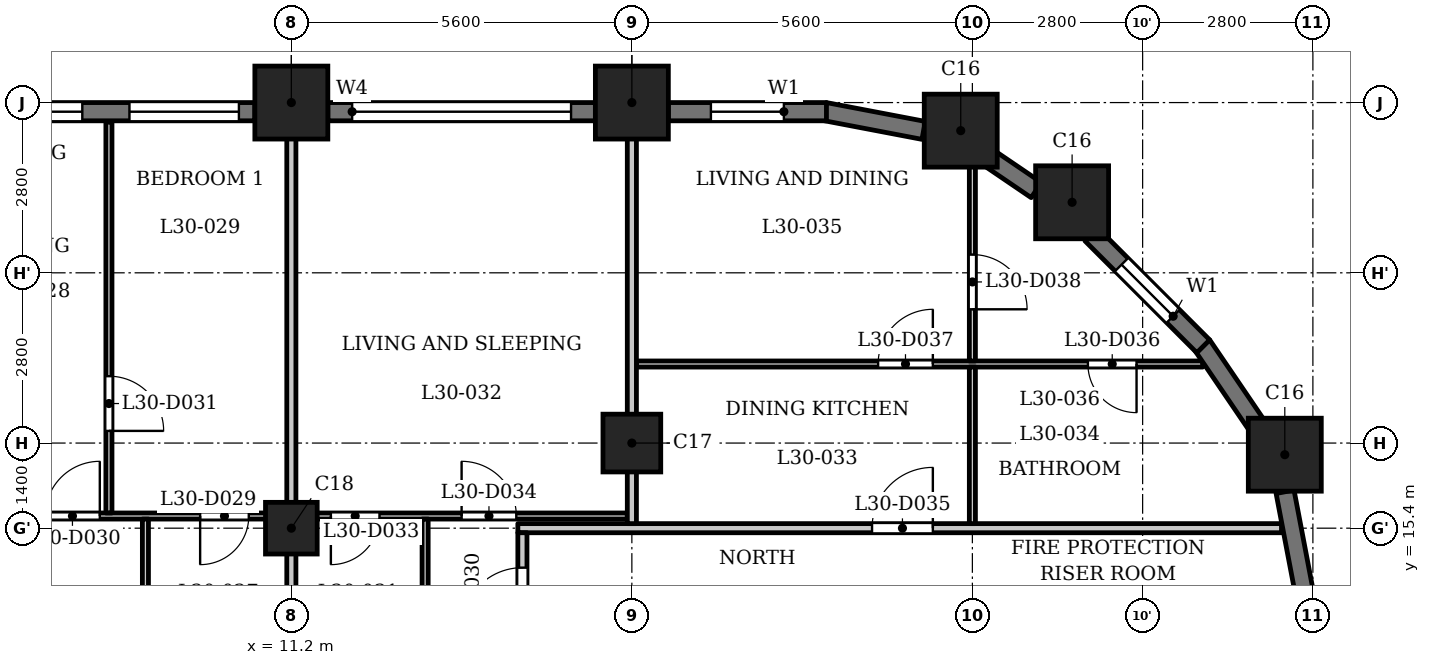
"""IFC4 building model, lengths in metres.
Left out: names, types, materials, properties, quantities, classifications, styles, units other than length and angle.
Written with IfcOpenShell. Run it as: python <this file> out.ifc"""

import sys

from ifc_helpers import new_model, si_unit, direction, frame, frame_2d, origin, origin_2d, place, context, subcontext, project, spatial, rectangle, extrude, element, fill, save


model = new_model("IFC4")
c1 = context("Model", 3, precision=1e-05, world=origin(), true_north=direction((0.0, 1.0)))
c2 = subcontext(c1, "Body", "Model", "MODEL_VIEW")
j1 = project(units=[si_unit("LENGTHUNIT", "METRE"), si_unit("PLANEANGLEUNIT", "RADIAN")], contexts=[c1])
p1 = place(None, origin())
s1 = spatial("IfcSite", under=j1, at=p1, CompositionType="ELEMENT")
p2 = place(p1, origin())
s2 = spatial("IfcBuilding", under=s1, at=p2, CompositionType="ELEMENT")
p3 = place(p2, frame((0.0, 0.0, 118.3)))
s3 = spatial("IfcBuildingStorey", under=s2, at=p3, CompositionType="ELEMENT", Elevation=118.3)
for number, where, z_axis, x_axis in (
    (1, (27.538, 16.609, 0.0), (0.0, 0.0, 1.0), (1.0, 0.0, 0.0)),
    (2, (24.04, 20.76, 0.0), (0.0, 0.0, 1.0), (1.0, 0.0, 0.0)),
    (3, (22.209, 21.938, 0.0), (0.0, 0.0, 1.0), (1.0, 0.0, 0.0)),
    (4, (16.8, 22.4, 0.0), (0.0, 0.0, 1.0), (1.0, 0.0, 0.0)),
    (5, (11.2, 22.4, 0.0), (0.0, 0.0, 1.0), (1.0, 0.0, 0.0)),
):
    element("IfcColumn", number, at=place(p3, frame(where, z_axis=z_axis, x_axis=x_axis)), inside=s3, PredefinedType="COLUMN", context=c2, shape_type="SweptSolid", body=[
        extrude(rectangle(XDim=1.2, YDim=1.2, at=origin_2d()), origin(), (0.0, 0.0, 1.0), 3.5),
    ])
p4 = place(p3, frame((16.8, 16.8, 0.0), z_axis=(0.0, 0.0, 1.0), x_axis=(1.0, 0.0, 0.0)))
e6 = element("IfcColumn", 6, at=p4, inside=s3, PredefinedType="COLUMN", context=c2, shape_type="SweptSolid", body=[
    extrude(rectangle(XDim=0.95, YDim=0.95, at=origin_2d()), origin(), (0.0, 0.0, 1.0), 3.5),
])
p5 = place(p3, frame((11.2, 15.4, 0.0), z_axis=(0.0, 0.0, 1.0), x_axis=(1.0, 0.0, 0.0)))
e7 = element("IfcColumn", 7, at=p5, inside=s3, PredefinedType="COLUMN", context=c2, shape_type="SweptSolid", body=[
    extrude(rectangle(XDim=0.85, YDim=0.85, at=origin_2d()), origin(), (0.0, 0.0, 1.0), 3.5),
])
for number, where, z_axis, x_axis in (
    (8, (27.853, 14.372, 0.0), (0.0, 0.0, 1.0), (-0.187, 0.982, 0.0)),
    (9, (27.11, 17.043, 0.0), (0.0, 0.0, 1.0), (-0.562, 0.827, 0.0)),
):
    element("IfcWall", number, at=place(p3, frame(where, z_axis=z_axis, x_axis=x_axis)), inside=s3, PredefinedType="SOLIDWALL", context=c2, shape_type="SweptSolid", body=[
        extrude(rectangle(XDim=1.656, YDim=0.3, at=frame_2d((0.828, 0.0))), origin(), (0.0, 0.0, 1.0), 2.4),
    ])
p6 = place(p3, frame((26.197, 18.391, 0.0), z_axis=(0.0, 0.0, 1.0), x_axis=(-0.707059830104, 0.707153729152, 0.0)))
e10 = element("IfcWall", 10, at=p6, inside=s3, PredefinedType="SOLIDWALL", context=c2, shape_type="SweptSolid", body=[
    extrude(rectangle(XDim=2.6, YDim=0.3, at=frame_2d((1.3, 0.0))), origin(), (0.0, 0.0, 1.0), 2.4),
])
p7 = place(p6, frame((0.7, 0.0, 0.6)))
e11 = element("IfcOpeningElement", 11, at=p7, cuts=e10, PredefinedType="OPENING", context=c2, shape_type="SweptSolid", body=[
    extrude(rectangle(XDim=1.2, YDim=1.55, at=frame_2d((0.6, 0.775))), frame((0.0, 0.16, 0.0), z_axis=(0.0, -1.0, 0.0), x_axis=(1.0, 0.0, 0.0)), (0.0, 0.0, 1.0), 0.32),
])
p8 = place(p3, frame((23.451, 20.96, 0.0), z_axis=(0.0, 0.0, 1.0), x_axis=(-0.827019434577, 0.562173331661, 0.0)))
e12 = element("IfcWall", 12, at=p8, inside=s3, PredefinedType="SOLIDWALL", context=c2, shape_type="SweptSolid", body=[
    extrude(rectangle(XDim=0.977, YDim=0.3, at=frame_2d((0.489, 0.0))), origin(), (0.0, 0.0, 1.0), 3.2),
])
p9 = place(p3, frame((21.599, 21.942, 0.0), z_axis=(0.0, 0.0, 1.0), x_axis=(-0.98228820662, 0.187376303559, 0.0)))
e13 = element("IfcWall", 13, at=p9, inside=s3, PredefinedType="SOLIDWALL", context=c2, shape_type="SweptSolid", body=[
    extrude(rectangle(XDim=1.656, YDim=0.3, at=frame_2d((0.828, 0.0))), origin(), (0.0, 0.0, 1.0), 2.4),
])
p10 = place(p3, frame((20.0, 22.25, 0.0), z_axis=(0.0, 0.0, 1.0), x_axis=(-1.0, 0.0, 0.0)))
e14 = element("IfcWall", 14, at=p10, inside=s3, PredefinedType="SOLIDWALL", context=c2, shape_type="SweptSolid", body=[
    extrude(rectangle(XDim=2.6, YDim=0.3, at=frame_2d((1.3, 0.0))), origin(), (0.0, 0.0, 1.0), 2.4),
])
p11 = place(p10, frame((0.7, 0.0, 0.6)))
e15 = element("IfcOpeningElement", 15, at=p11, cuts=e14, PredefinedType="OPENING", context=c2, shape_type="SweptSolid", body=[
    extrude(rectangle(XDim=1.2, YDim=1.55, at=frame_2d((0.6, 0.775))), frame((0.0, 0.16, 0.0), z_axis=(0.0, -1.0, 0.0), x_axis=(1.0, 0.0, 0.0)), (0.0, 0.0, 1.0), 0.32),
])
p12 = place(p3, frame((16.2, 22.25, 0.0), z_axis=(0.0, 0.0, 1.0), x_axis=(-1.0, 0.0, 0.0)))
e16 = element("IfcWall", 16, at=p12, inside=s3, PredefinedType="SOLIDWALL", context=c2, shape_type="SweptSolid", body=[
    extrude(rectangle(XDim=4.4, YDim=0.3, at=frame_2d((2.2, 0.0))), origin(), (0.0, 0.0, 1.0), 2.4),
])
p13 = place(p12, frame((0.4, 0.0, 1.2)))
e17 = element("IfcOpeningElement", 17, at=p13, cuts=e16, PredefinedType="OPENING", context=c2, shape_type="SweptSolid", body=[
    extrude(rectangle(XDim=3.6, YDim=0.95, at=frame_2d((1.8, 0.475))), frame((0.0, 0.16, 0.0), z_axis=(0.0, -1.0, 0.0), x_axis=(1.0, 0.0, 0.0)), (0.0, 0.0, 1.0), 0.32),
])
p14 = place(p3, frame((10.6, 22.25, 0.0), z_axis=(0.0, 0.0, 1.0), x_axis=(-1.0, 0.0, 0.0)))
e18 = element("IfcWall", 18, at=p14, inside=s3, PredefinedType="SOLIDWALL", context=c2, shape_type="SweptSolid", body=[
    extrude(rectangle(XDim=4.4, YDim=0.3, at=frame_2d((2.2, 0.0))), origin(), (0.0, 0.0, 1.0), 2.4),
])
p15 = place(p14, frame((0.262, 0.0, 0.9)))
e19 = element("IfcOpeningElement", 19, at=p15, cuts=e18, PredefinedType="OPENING", context=c2, shape_type="SweptSolid", body=[
    extrude(rectangle(XDim=1.8, YDim=1.25, at=frame_2d((0.9, 0.625))), frame((0.0, 0.16, 0.0), z_axis=(0.0, -1.0, 0.0), x_axis=(1.0, 0.0, 0.0)), (0.0, 0.0, 1.0), 0.32),
])
p16 = place(p14, frame((2.837, 0.0, 0.6)))
e20 = element("IfcOpeningElement", 20, at=p16, cuts=e18, PredefinedType="OPENING", context=c2, shape_type="SweptSolid", body=[
    extrude(rectangle(XDim=1.2, YDim=1.55, at=frame_2d((0.6, 0.775))), frame((0.0, 0.16, 0.0), z_axis=(0.0, -1.0, 0.0), x_axis=(1.0, 0.0, 0.0)), (0.0, 0.0, 1.0), 0.32),
])
p17 = place(p3, frame((14.925, 15.4, 0.0), z_axis=(0.0, 0.0, 1.0), x_axis=(1.0, 0.0, 0.0)))
e21 = element("IfcWall", 21, at=p17, inside=s3, PredefinedType="PARTITIONING", context=c2, shape_type="SweptSolid", body=[
    extrude(rectangle(XDim=12.559, YDim=0.15, at=frame_2d((6.279, 0.0))), origin(), (0.0, 0.0, 1.0), 3.2),
])
p18 = place(p17, frame((5.825, 0.0, 0.0)))
e22 = element("IfcOpeningElement", 22, at=p18, cuts=e21, PredefinedType="OPENING", context=c2, shape_type="SweptSolid", body=[
    extrude(rectangle(XDim=1.0, YDim=2.1, at=frame_2d((0.5, 1.05))), frame((0.0, 0.085, 0.0), z_axis=(0.0, -1.0, 0.0), x_axis=(1.0, 0.0, 0.0)), (0.0, 0.0, 1.0), 0.17),
])
p19 = place(p3, frame((-16.725, 15.6, 0.0), z_axis=(0.0, 0.0, 1.0), x_axis=(1.0, 0.0, 0.0)))
e23 = element("IfcWall", 23, at=p19, inside=s3, PredefinedType="PARTITIONING", context=c2, shape_type="SweptSolid", body=[
    extrude(rectangle(XDim=33.45, YDim=0.1, at=frame_2d((16.725, 0.0))), origin(), (0.0, 0.0, 1.0), 3.2),
])
p20 = place(p19, frame((9.425, 0.0, 0.0)))
e24 = element("IfcOpeningElement", 24, at=p20, cuts=e23, PredefinedType="OPENING", context=c2, shape_type="SweptSolid", body=[
    extrude(rectangle(XDim=0.8, YDim=2.1, at=frame_2d((0.4, 1.05))), frame((0.0, 0.06, 0.0), z_axis=(0.0, -1.0, 0.0), x_axis=(1.0, 0.0, 0.0)), (0.0, 0.0, 1.0), 0.12),
])
p21 = place(p19, frame((6.975, 0.0, 0.0)))
e25 = element("IfcOpeningElement", 25, at=p21, cuts=e23, PredefinedType="OPENING", context=c2, shape_type="SweptSolid", body=[
    extrude(rectangle(XDim=0.9, YDim=2.1, at=frame_2d((0.45, 1.05))), frame((0.0, 0.06, 0.0), z_axis=(0.0, -1.0, 0.0), x_axis=(1.0, 0.0, 0.0)), (0.0, 0.0, 1.0), 0.12),
])
p22 = place(p19, frame((1.875, 0.0, 0.0)))
e26 = element("IfcOpeningElement", 26, at=p22, cuts=e23, PredefinedType="OPENING", context=c2, shape_type="SweptSolid", body=[
    extrude(rectangle(XDim=0.9, YDim=2.1, at=frame_2d((0.45, 1.05))), frame((0.0, 0.06, 0.0), z_axis=(0.0, -1.0, 0.0), x_axis=(1.0, 0.0, 0.0)), (0.0, 0.0, 1.0), 0.12),
])
p23 = place(p19, frame((3.475, 0.0, 0.0)))
e27 = element("IfcOpeningElement", 27, at=p23, cuts=e23, PredefinedType="OPENING", context=c2, shape_type="SweptSolid", body=[
    extrude(rectangle(XDim=0.9, YDim=2.1, at=frame_2d((0.45, 1.05))), frame((0.0, 0.06, 0.0), z_axis=(0.0, -1.0, 0.0), x_axis=(1.0, 0.0, 0.0)), (0.0, 0.0, 1.0), 0.12),
])
p24 = place(p19, frame((11.775, 0.0, 0.0)))
e28 = element("IfcOpeningElement", 28, at=p24, cuts=e23, PredefinedType="OPENING", context=c2, shape_type="SweptSolid", body=[
    extrude(rectangle(XDim=0.8, YDim=2.1, at=frame_2d((0.4, 1.05))), frame((0.0, 0.06, 0.0), z_axis=(0.0, -1.0, 0.0), x_axis=(1.0, 0.0, 0.0)), (0.0, 0.0, 1.0), 0.12),
])
p25 = place(p19, frame((14.175, 0.0, 0.0)))
e29 = element("IfcOpeningElement", 29, at=p25, cuts=e23, PredefinedType="OPENING", context=c2, shape_type="SweptSolid", body=[
    extrude(rectangle(XDim=0.9, YDim=2.1, at=frame_2d((0.45, 1.05))), frame((0.0, 0.06, 0.0), z_axis=(0.0, -1.0, 0.0), x_axis=(1.0, 0.0, 0.0)), (0.0, 0.0, 1.0), 0.12),
])
p26 = place(p19, frame((20.725, 0.0, 0.0)))
e30 = element("IfcOpeningElement", 30, at=p26, cuts=e23, PredefinedType="OPENING", context=c2, shape_type="SweptSolid", body=[
    extrude(rectangle(XDim=0.8, YDim=2.1, at=frame_2d((0.4, 1.05))), frame((0.0, 0.06, 0.0), z_axis=(0.0, -1.0, 0.0), x_axis=(1.0, 0.0, 0.0)), (0.0, 0.0, 1.0), 0.12),
])
p27 = place(p19, frame((18.375, 0.0, 0.0)))
e31 = element("IfcOpeningElement", 31, at=p27, cuts=e23, PredefinedType="OPENING", context=c2, shape_type="SweptSolid", body=[
    extrude(rectangle(XDim=0.9, YDim=2.1, at=frame_2d((0.45, 1.05))), frame((0.0, 0.06, 0.0), z_axis=(0.0, -1.0, 0.0), x_axis=(1.0, 0.0, 0.0)), (0.0, 0.0, 1.0), 0.12),
])
p28 = place(p19, frame((26.425, 0.0, 0.0)))
e32 = element("IfcOpeningElement", 32, at=p28, cuts=e23, PredefinedType="OPENING", context=c2, shape_type="SweptSolid", body=[
    extrude(rectangle(XDim=0.8, YDim=2.1, at=frame_2d((0.4, 1.05))), frame((0.0, 0.06, 0.0), z_axis=(0.0, -1.0, 0.0), x_axis=(1.0, 0.0, 0.0)), (0.0, 0.0, 1.0), 0.12),
])
p29 = place(p19, frame((23.875, 0.0, 0.0)))
e33 = element("IfcOpeningElement", 33, at=p29, cuts=e23, PredefinedType="OPENING", context=c2, shape_type="SweptSolid", body=[
    extrude(rectangle(XDim=0.9, YDim=2.1, at=frame_2d((0.45, 1.05))), frame((0.0, 0.06, 0.0), z_axis=(0.0, -1.0, 0.0), x_axis=(1.0, 0.0, 0.0)), (0.0, 0.0, 1.0), 0.12),
])
p30 = place(p19, frame((28.575, 0.0, 0.0)))
e34 = element("IfcOpeningElement", 34, at=p30, cuts=e23, PredefinedType="OPENING", context=c2, shape_type="SweptSolid", body=[
    extrude(rectangle(XDim=0.8, YDim=2.1, at=frame_2d((0.4, 1.05))), frame((0.0, 0.06, 0.0), z_axis=(0.0, -1.0, 0.0), x_axis=(1.0, 0.0, 0.0)), (0.0, 0.0, 1.0), 0.12),
])
p31 = place(p19, frame((30.725, 0.0, 0.0)))
e35 = element("IfcOpeningElement", 35, at=p31, cuts=e23, PredefinedType="OPENING", context=c2, shape_type="SweptSolid", body=[
    extrude(rectangle(XDim=0.9, YDim=2.1, at=frame_2d((0.45, 1.05))), frame((0.0, 0.06, 0.0), z_axis=(0.0, -1.0, 0.0), x_axis=(1.0, 0.0, 0.0)), (0.0, 0.0, 1.0), 0.12),
])
p32 = place(p3, frame((16.875, 18.1, 0.0), z_axis=(0.0, 0.0, 1.0), x_axis=(1.0, 0.0, 0.0)))
e36 = element("IfcWall", 36, at=p32, inside=s3, PredefinedType="PARTITIONING", context=c2, shape_type="SweptSolid", body=[
    extrude(rectangle(XDim=9.315, YDim=0.1, at=frame_2d((4.658, 0.0))), origin(), (0.0, 0.0, 1.0), 3.2),
])
p33 = place(p32, frame((7.425, 0.0, 0.0)))
e37 = element("IfcOpeningElement", 37, at=p33, cuts=e36, PredefinedType="OPENING", context=c2, shape_type="SweptSolid", body=[
    extrude(rectangle(XDim=0.8, YDim=2.1, at=frame_2d((0.4, 1.05))), frame((0.0, 0.06, 0.0), z_axis=(0.0, -1.0, 0.0), x_axis=(1.0, 0.0, 0.0)), (0.0, 0.0, 1.0), 0.12),
])
p34 = place(p32, frame((3.975, 0.0, 0.0)))
e38 = element("IfcOpeningElement", 38, at=p34, cuts=e36, PredefinedType="OPENING", context=c2, shape_type="SweptSolid", body=[
    extrude(rectangle(XDim=0.9, YDim=2.1, at=frame_2d((0.45, 1.05))), frame((0.0, 0.06, 0.0), z_axis=(0.0, -1.0, 0.0), x_axis=(1.0, 0.0, 0.0)), (0.0, 0.0, 1.0), 0.12),
])
p35 = place(p3, frame((8.2, 15.65, 0.0), z_axis=(0.0, 0.0, 1.0), x_axis=(0.0, 1.0, 0.0)))
e39 = element("IfcWall", 39, at=p35, inside=s3, PredefinedType="PARTITIONING", context=c2, shape_type="SweptSolid", body=[
    extrude(rectangle(XDim=6.43, YDim=0.1, at=frame_2d((3.215, 0.0))), origin(), (0.0, 0.0, 1.0), 3.2),
])
p36 = place(p35, frame((1.35, 0.0, 0.0)))
e40 = element("IfcOpeningElement", 40, at=p36, cuts=e39, PredefinedType="OPENING", context=c2, shape_type="SweptSolid", body=[
    extrude(rectangle(XDim=0.9, YDim=2.1, at=frame_2d((0.45, 1.05))), frame((0.0, 0.06, 0.0), z_axis=(0.0, -1.0, 0.0), x_axis=(1.0, 0.0, 0.0)), (0.0, 0.0, 1.0), 0.12),
])
p37 = place(p3, frame((8.8, 13.275, 0.0), z_axis=(0.0, 0.0, 1.0), x_axis=(0.0, 1.0, 0.0)))
e41 = element("IfcWall", 41, at=p37, inside=s3, PredefinedType="PARTITIONING", context=c2, shape_type="SweptSolid", body=[
    extrude(rectangle(XDim=2.275, YDim=0.1, at=frame_2d((1.138, 0.0))), origin(), (0.0, 0.0, 1.0), 3.2),
])
p38 = place(p3, frame((11.2, 13.275, 0.0), z_axis=(0.0, 0.0, 1.0), x_axis=(0.0, 1.0, 0.0)))
e42 = element("IfcWall", 42, at=p38, inside=s3, PredefinedType="PARTITIONING", context=c2, shape_type="SweptSolid", body=[
    extrude(rectangle(XDim=2.275, YDim=0.15, at=frame_2d((1.138, 0.0))), origin(), (0.0, 0.0, 1.0), 3.2),
])
p39 = place(p3, frame((11.2, 15.65, 0.0), z_axis=(0.0, 0.0, 1.0), x_axis=(0.0, 1.0, 0.0)))
e43 = element("IfcWall", 43, at=p39, inside=s3, PredefinedType="PARTITIONING", context=c2, shape_type="SweptSolid", body=[
    extrude(rectangle(XDim=7.33, YDim=0.15, at=frame_2d((3.665, 0.0))), origin(), (0.0, 0.0, 1.0), 3.2),
])
p40 = place(p3, frame((13.4, 13.275, 0.0), z_axis=(0.0, 0.0, 1.0), x_axis=(0.0, 1.0, 0.0)))
e44 = element("IfcWall", 44, at=p40, inside=s3, PredefinedType="PARTITIONING", context=c2, shape_type="SweptSolid", body=[
    extrude(rectangle(XDim=2.275, YDim=0.1, at=frame_2d((1.138, 0.0))), origin(), (0.0, 0.0, 1.0), 3.2),
])
p41 = place(p3, frame((15.0, 13.275, 0.0), z_axis=(0.0, 0.0, 1.0), x_axis=(0.0, 1.0, 0.0)))
e45 = element("IfcWall", 45, at=p41, inside=s3, PredefinedType="PARTITIONING", context=c2, shape_type="SweptSolid", body=[
    extrude(rectangle(XDim=2.05, YDim=0.15, at=frame_2d((1.025, 0.0))), origin(), (0.0, 0.0, 1.0), 3.2),
])
p42 = place(p41, frame((0.476, 0.0, 0.0)))
e46 = element("IfcOpeningElement", 46, at=p42, cuts=e45, PredefinedType="OPENING", context=c2, shape_type="SweptSolid", body=[
    extrude(rectangle(XDim=1.0, YDim=2.1, at=frame_2d((0.5, 1.05))), frame((0.0, 0.085, 0.0), z_axis=(0.0, -1.0, 0.0), x_axis=(1.0, 0.0, 0.0)), (0.0, 0.0, 1.0), 0.17),
])
p43 = place(p3, frame((16.8, 15.475, 0.0), z_axis=(0.0, 0.0, 1.0), x_axis=(0.0, 1.0, 0.0)))
e47 = element("IfcWall", 47, at=p43, inside=s3, PredefinedType="PARTITIONING", context=c2, shape_type="SweptSolid", body=[
    extrude(rectangle(XDim=7.505, YDim=0.15, at=frame_2d((3.752, 0.0))), origin(), (0.0, 0.0, 1.0), 3.2),
])
p44 = place(p3, frame((22.4, 15.475, 0.0), z_axis=(0.0, 0.0, 1.0), x_axis=(0.0, 1.0, 0.0)))
e48 = element("IfcWall", 48, at=p44, inside=s3, PredefinedType="PARTITIONING", context=c2, shape_type="SweptSolid", body=[
    extrude(rectangle(XDim=2.575, YDim=0.1, at=frame_2d((1.288, 0.0))), origin(), (0.0, 0.0, 1.0), 3.2),
])
p45 = place(p3, frame((22.4, 18.15, 0.0), z_axis=(0.0, 0.0, 1.0), x_axis=(0.0, 1.0, 0.0)))
e49 = element("IfcWall", 49, at=p45, inside=s3, PredefinedType="PARTITIONING", context=c2, shape_type="SweptSolid", body=[
    extrude(rectangle(XDim=3.57, YDim=0.1, at=frame_2d((1.785, 0.0))), origin(), (0.0, 0.0, 1.0), 3.2),
])
p46 = place(p45, frame((0.85, 0.0, 0.0)))
e50 = element("IfcOpeningElement", 50, at=p46, cuts=e49, PredefinedType="OPENING", context=c2, shape_type="SweptSolid", body=[
    extrude(rectangle(XDim=0.9, YDim=2.1, at=frame_2d((0.45, 1.05))), frame((0.0, 0.06, 0.0), z_axis=(0.0, -1.0, 0.0), x_axis=(1.0, 0.0, 0.0)), (0.0, 0.0, 1.0), 0.12),
])
p47 = place(p28, origin())
e51 = element("IfcDoor", 51, at=p47, inside=s3, OperationType="SINGLE_SWING_LEFT", PredefinedType="DOOR", context=c2, shape_type="SweptSolid", body=[
    extrude(rectangle(XDim=0.8, YDim=2.1, at=frame_2d((0.4, 1.05))), frame((0.0, 0.025, 0.0), z_axis=(0.0, -1.0, 0.0), x_axis=(1.0, 0.0, 0.0)), (0.0, 0.0, 1.0), 0.05),
])
fill(e32, e51)
p48 = place(p29, origin())
e52 = element("IfcDoor", 52, at=p48, inside=s3, OperationType="SINGLE_SWING_LEFT", PredefinedType="DOOR", context=c2, shape_type="SweptSolid", body=[
    extrude(rectangle(XDim=0.9, YDim=2.1, at=frame_2d((0.45, 1.05))), frame((0.0, 0.025, 0.0), z_axis=(0.0, -1.0, 0.0), x_axis=(1.0, 0.0, 0.0)), (0.0, 0.0, 1.0), 0.05),
])
fill(e33, e52)
p49 = place(p36, origin())
e53 = element("IfcDoor", 53, at=p49, inside=s3, OperationType="SINGLE_SWING_LEFT", PredefinedType="DOOR", context=c2, shape_type="SweptSolid", body=[
    extrude(rectangle(XDim=0.9, YDim=2.1, at=frame_2d((0.45, 1.05))), frame((0.0, 0.025, 0.0), z_axis=(0.0, -1.0, 0.0), x_axis=(1.0, 0.0, 0.0)), (0.0, 0.0, 1.0), 0.05),
])
fill(e40, e53)
p50 = place(p42, origin())
e54 = element("IfcDoor", 54, at=p50, inside=s3, OperationType="SINGLE_SWING_RIGHT", PredefinedType="DOOR", context=c2, shape_type="SweptSolid", body=[
    extrude(rectangle(XDim=1.0, YDim=2.1, at=frame_2d((0.5, 1.05))), frame((0.0, 0.025, 0.0), z_axis=(0.0, -1.0, 0.0), x_axis=(1.0, 0.0, 0.0)), (0.0, 0.0, 1.0), 0.05),
])
fill(e46, e54)
p51 = place(p30, origin())
e55 = element("IfcDoor", 55, at=p51, inside=s3, OperationType="SINGLE_SWING_LEFT", PredefinedType="DOOR", context=c2, shape_type="SweptSolid", body=[
    extrude(rectangle(XDim=0.8, YDim=2.1, at=frame_2d((0.4, 1.05))), frame((0.0, 0.025, 0.0), z_axis=(0.0, -1.0, 0.0), x_axis=(1.0, 0.0, 0.0)), (0.0, 0.0, 1.0), 0.05),
])
fill(e34, e55)
p52 = place(p31, origin())
e56 = element("IfcDoor", 56, at=p52, inside=s3, OperationType="SINGLE_SWING_RIGHT", PredefinedType="DOOR", context=c2, shape_type="SweptSolid", body=[
    extrude(rectangle(XDim=0.9, YDim=2.1, at=frame_2d((0.45, 1.05))), frame((0.0, 0.025, 0.0), z_axis=(0.0, -1.0, 0.0), x_axis=(1.0, 0.0, 0.0)), (0.0, 0.0, 1.0), 0.05),
])
fill(e35, e56)
p53 = place(p18, origin())
e57 = element("IfcDoor", 57, at=p53, inside=s3, OperationType="SINGLE_SWING_LEFT", PredefinedType="DOOR", context=c2, shape_type="SweptSolid", body=[
    extrude(rectangle(XDim=1.0, YDim=2.1, at=frame_2d((0.5, 1.05))), frame((0.0, 0.025, 0.0), z_axis=(0.0, -1.0, 0.0), x_axis=(1.0, 0.0, 0.0)), (0.0, 0.0, 1.0), 0.05),
])
fill(e22, e57)
p54 = place(p33, origin())
e58 = element("IfcDoor", 58, at=p54, inside=s3, OperationType="SINGLE_SWING_RIGHT", PredefinedType="DOOR", context=c2, shape_type="SweptSolid", body=[
    extrude(rectangle(XDim=0.8, YDim=2.1, at=frame_2d((0.4, 1.05))), frame((0.0, 0.025, 0.0), z_axis=(0.0, -1.0, 0.0), x_axis=(1.0, 0.0, 0.0)), (0.0, 0.0, 1.0), 0.05),
])
fill(e37, e58)
p55 = place(p34, origin())
e59 = element("IfcDoor", 59, at=p55, inside=s3, OperationType="SINGLE_SWING_LEFT", PredefinedType="DOOR", context=c2, shape_type="SweptSolid", body=[
    extrude(rectangle(XDim=0.9, YDim=2.1, at=frame_2d((0.45, 1.05))), frame((0.0, 0.025, 0.0), z_axis=(0.0, -1.0, 0.0), x_axis=(1.0, 0.0, 0.0)), (0.0, 0.0, 1.0), 0.05),
])
fill(e38, e59)
p56 = place(p46, origin())
e60 = element("IfcDoor", 60, at=p56, inside=s3, OperationType="SINGLE_SWING_LEFT", PredefinedType="DOOR", context=c2, shape_type="SweptSolid", body=[
    extrude(rectangle(XDim=0.9, YDim=2.1, at=frame_2d((0.45, 1.05))), frame((0.0, 0.025, 0.0), z_axis=(0.0, -1.0, 0.0), x_axis=(1.0, 0.0, 0.0)), (0.0, 0.0, 1.0), 0.05),
])
fill(e50, e60)
p57 = place(p7, origin())
e61 = element("IfcWindow", 61, at=p57, inside=s3, PartitioningType="SINGLE_PANEL", PredefinedType="WINDOW", context=c2, shape_type="SweptSolid", body=[
    extrude(rectangle(XDim=1.2, YDim=1.55, at=frame_2d((0.6, 0.775))), frame((0.0, 0.03, 0.0), z_axis=(0.0, -1.0, 0.0), x_axis=(1.0, 0.0, 0.0)), (0.0, 0.0, 1.0), 0.06),
])
fill(e11, e61)
p58 = place(p11, origin())
e62 = element("IfcWindow", 62, at=p58, inside=s3, PartitioningType="SINGLE_PANEL", PredefinedType="WINDOW", context=c2, shape_type="SweptSolid", body=[
    extrude(rectangle(XDim=1.2, YDim=1.55, at=frame_2d((0.6, 0.775))), frame((0.0, 0.03, 0.0), z_axis=(0.0, -1.0, 0.0), x_axis=(1.0, 0.0, 0.0)), (0.0, 0.0, 1.0), 0.06),
])
fill(e15, e62)
p59 = place(p13, origin())
e63 = element("IfcWindow", 63, at=p59, inside=s3, PartitioningType="SINGLE_PANEL", PredefinedType="WINDOW", context=c2, shape_type="SweptSolid", body=[
    extrude(rectangle(XDim=3.6, YDim=0.95, at=frame_2d((1.8, 0.475))), frame((0.0, 0.03, 0.0), z_axis=(0.0, -1.0, 0.0), x_axis=(1.0, 0.0, 0.0)), (0.0, 0.0, 1.0), 0.06),
])
fill(e17, e63)
p60 = place(p15, origin())
e64 = element("IfcWindow", 64, at=p60, inside=s3, PartitioningType="SINGLE_PANEL", PredefinedType="WINDOW", context=c2, shape_type="SweptSolid", body=[
    extrude(rectangle(XDim=1.8, YDim=1.25, at=frame_2d((0.9, 0.625))), frame((0.0, 0.03, 0.0), z_axis=(0.0, -1.0, 0.0), x_axis=(1.0, 0.0, 0.0)), (0.0, 0.0, 1.0), 0.06),
])
fill(e19, e64)
p61 = place(p16, origin())
e65 = element("IfcWindow", 65, at=p61, inside=s3, PartitioningType="SINGLE_PANEL", PredefinedType="WINDOW", context=c2, shape_type="SweptSolid", body=[
    extrude(rectangle(XDim=1.2, YDim=1.55, at=frame_2d((0.6, 0.775))), frame((0.0, 0.03, 0.0), z_axis=(0.0, -1.0, 0.0), x_axis=(1.0, 0.0, 0.0)), (0.0, 0.0, 1.0), 0.06),
])
fill(e20, e65)
save(model, sys.argv[1])
